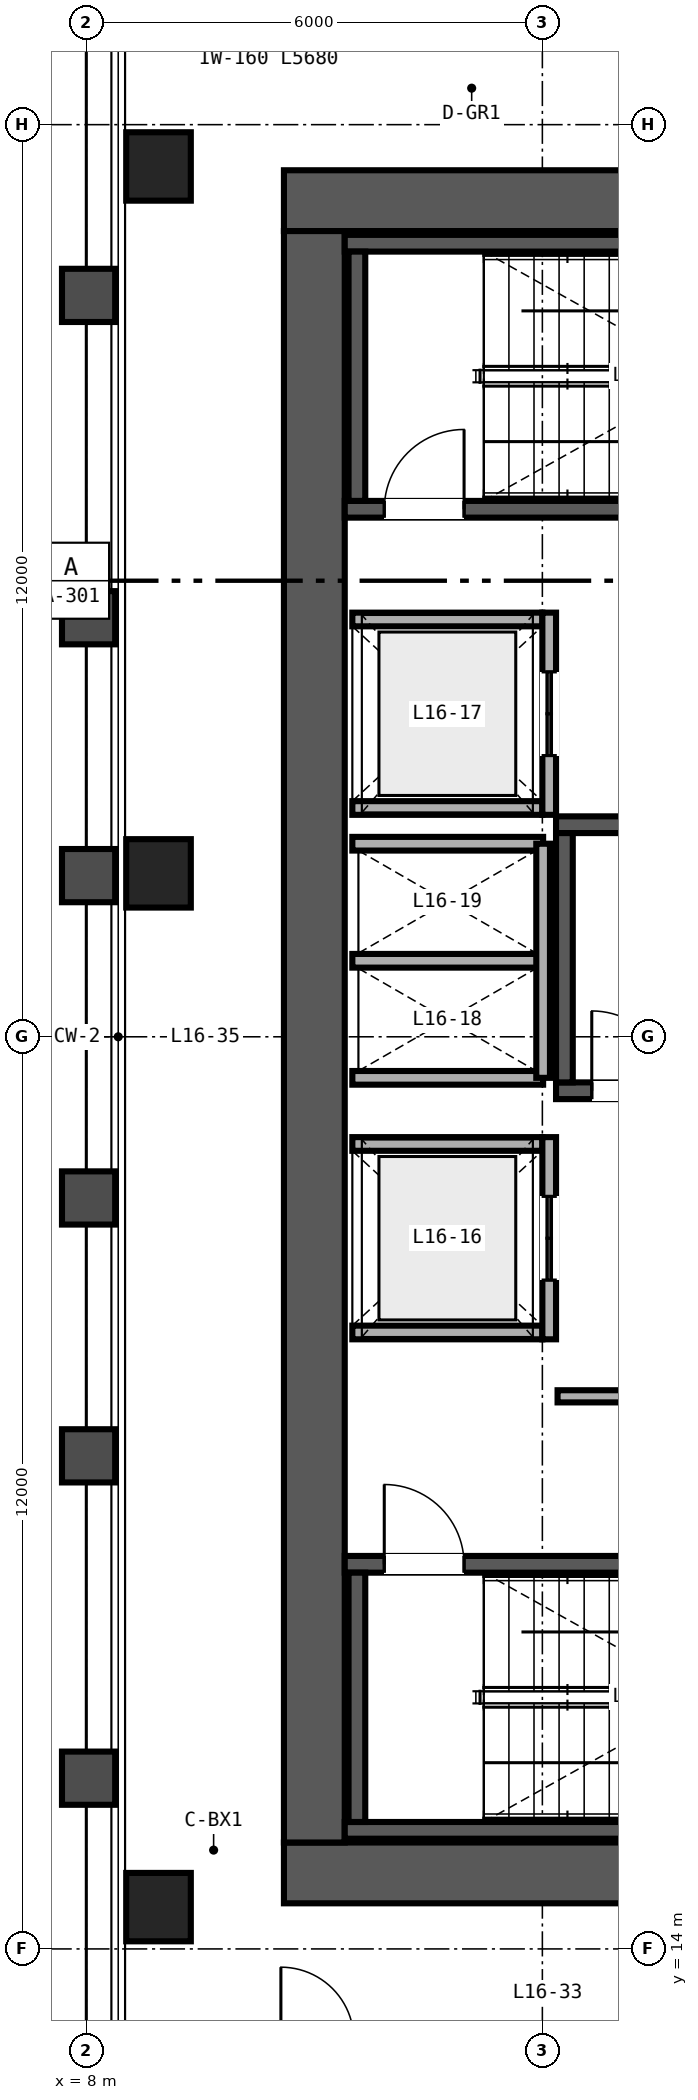
"""IFC4 building model, lengths in metres.
Left out: names, types, materials, properties, quantities, classifications, styles, units other than length and angle.
Written with IfcOpenShell. Run it as: python <this file> out.ifc"""

import sys

from ifc_helpers import new_model, si_unit, direction, frame, frame_2d, origin, origin_2d, place, context, subcontext, project, spatial, rectangle, hollow_rectangle, extrude, source, transform, mapped, element, fill, save


model = new_model("IFC4")
c1 = context("Model", 3, precision=1e-05, world=origin(), true_north=direction((0.0, 1.0)))
c2 = subcontext(c1, "Body", "Model", "MODEL_VIEW")
j1 = project(units=[si_unit("LENGTHUNIT", "METRE"), si_unit("PLANEANGLEUNIT", "RADIAN")], contexts=[c1])
p1 = place(None, origin())
s1 = spatial("IfcSite", under=j1, at=p1, CompositionType="ELEMENT")
p2 = place(p1, origin())
s2 = spatial("IfcBuilding", under=s1, at=p2, CompositionType="ELEMENT")
p3 = place(p2, frame((0.0, 0.0, 67.2)))
s3 = spatial("IfcBuildingStorey", under=s2, at=p3, CompositionType="ELEMENT", Elevation=67.2)
p4 = place(p3, frame((10.6, 15.0, 0.0), z_axis=(0.0, 0.0, 1.0), x_axis=(1.0, 0.0, 0.0)))
e1 = element("IfcWall", 1, at=p4, inside=s3, PredefinedType="SHEAR", context=c2, shape_type="SweptSolid", body=[
    extrude(rectangle(XDim=12.8, YDim=0.8, at=frame_2d((6.4, 0.0))), origin(), (0.0, 0.0, 1.0), 3.35),
])
p5 = place(p4, frame((8.98, 0.0, 0.0)))
e2 = element("IfcOpeningElement", 2, at=p5, cuts=e1, PredefinedType="OPENING", context=c2, shape_type="SweptSolid", body=[
    extrude(rectangle(XDim=1.0, YDim=2.15, at=frame_2d((0.5, 1.075))), frame((0.0, 0.41, 0.0), z_axis=(0.0, -1.0, 0.0), x_axis=(1.0, 0.0, 0.0)), (0.0, 0.0, 1.0), 0.82),
])
p6 = place(p3, frame((10.6, 37.0, 0.0), z_axis=(0.0, 0.0, 1.0), x_axis=(1.0, 0.0, 0.0)))
e3 = element("IfcWall", 3, at=p6, inside=s3, PredefinedType="SHEAR", context=c2, shape_type="SweptSolid", body=[
    extrude(rectangle(XDim=12.8, YDim=0.8, at=frame_2d((6.4, 0.0))), origin(), (0.0, 0.0, 1.0), 3.35),
])
p7 = place(p6, frame((8.98, 0.0, 0.0)))
e4 = element("IfcOpeningElement", 4, at=p7, cuts=e3, PredefinedType="OPENING", context=c2, shape_type="SweptSolid", body=[
    extrude(rectangle(XDim=1.0, YDim=2.15, at=frame_2d((0.5, 1.075))), frame((0.0, 0.41, 0.0), z_axis=(0.0, -1.0, 0.0), x_axis=(1.0, 0.0, 0.0)), (0.0, 0.0, 1.0), 0.82),
])
p8 = place(p3, frame((11.0, 15.4, 0.0), z_axis=(0.0, 0.0, 1.0), x_axis=(0.0, 1.0, 0.0)))
e5 = element("IfcWall", 5, at=p8, inside=s3, PredefinedType="SHEAR", context=c2, shape_type="SweptSolid", body=[
    extrude(rectangle(XDim=21.2, YDim=0.8, at=frame_2d((10.6, 0.0))), origin(), (0.0, 0.0, 1.0), 3.35),
])
p9 = place(p3, frame((11.4, 15.56, 0.0), z_axis=(0.0, 0.0, 1.0), x_axis=(1.0, 0.0, 0.0)))
e6 = element("IfcWall", 6, at=p9, inside=s3, PredefinedType="SHEAR", context=c2, shape_type="SweptSolid", body=[
    extrude(rectangle(XDim=7.91, YDim=0.22, at=frame_2d((3.955, 0.0))), origin(), (0.0, 0.0, 1.0), 3.4),
])
p10 = place(p3, frame((11.4, 19.06, 0.0), z_axis=(0.0, 0.0, 1.0), x_axis=(1.0, 0.0, 0.0)))
e7 = element("IfcWall", 7, at=p10, inside=s3, PredefinedType="SHEAR", context=c2, shape_type="SweptSolid", body=[
    extrude(rectangle(XDim=7.91, YDim=0.22, at=frame_2d((3.955, 0.0))), origin(), (0.0, 0.0, 1.0), 3.4),
])
p11 = place(p10, frame((0.52, 0.0, 0.0)))
e8 = element("IfcOpeningElement", 8, at=p11, cuts=e7, PredefinedType="OPENING", context=c2, shape_type="SweptSolid", body=[
    extrude(rectangle(XDim=1.05, YDim=2.15, at=frame_2d((0.525, 1.075))), frame((0.0, 0.12, 0.0), z_axis=(0.0, -1.0, 0.0), x_axis=(1.0, 0.0, 0.0)), (0.0, 0.0, 1.0), 0.24),
])
p12 = place(p3, frame((11.56, 15.67, 0.0), z_axis=(0.0, 0.0, 1.0), x_axis=(0.0, 1.0, 0.0)))
e9 = element("IfcWall", 9, at=p12, inside=s3, PredefinedType="SHEAR", context=c2, shape_type="SweptSolid", body=[
    extrude(rectangle(XDim=3.28, YDim=0.22, at=frame_2d((1.64, 0.0))), origin(), (0.0, 0.0, 1.0), 3.4),
])
p13 = place(p3, frame((11.4, 32.94, 0.0), z_axis=(0.0, 0.0, 1.0), x_axis=(1.0, 0.0, 0.0)))
e10 = element("IfcWall", 10, at=p13, inside=s3, PredefinedType="SHEAR", context=c2, shape_type="SweptSolid", body=[
    extrude(rectangle(XDim=7.91, YDim=0.22, at=frame_2d((3.955, 0.0))), origin(), (0.0, 0.0, 1.0), 3.4),
])
p14 = place(p13, frame((0.52, 0.0, 0.0)))
e11 = element("IfcOpeningElement", 11, at=p14, cuts=e10, PredefinedType="OPENING", context=c2, shape_type="SweptSolid", body=[
    extrude(rectangle(XDim=1.05, YDim=2.15, at=frame_2d((0.525, 1.075))), frame((0.0, 0.12, 0.0), z_axis=(0.0, -1.0, 0.0), x_axis=(1.0, 0.0, 0.0)), (0.0, 0.0, 1.0), 0.24),
])
p15 = place(p3, frame((11.4, 36.44, 0.0), z_axis=(0.0, 0.0, 1.0), x_axis=(1.0, 0.0, 0.0)))
e12 = element("IfcWall", 12, at=p15, inside=s3, PredefinedType="SHEAR", context=c2, shape_type="SweptSolid", body=[
    extrude(rectangle(XDim=7.91, YDim=0.22, at=frame_2d((3.955, 0.0))), origin(), (0.0, 0.0, 1.0), 3.4),
])
p16 = place(p3, frame((11.56, 33.05, 0.0), z_axis=(0.0, 0.0, 1.0), x_axis=(0.0, 1.0, 0.0)))
e13 = element("IfcWall", 13, at=p16, inside=s3, PredefinedType="SHEAR", context=c2, shape_type="SweptSolid", body=[
    extrude(rectangle(XDim=3.28, YDim=0.22, at=frame_2d((1.64, 0.0))), origin(), (0.0, 0.0, 1.0), 3.4),
])
p17 = place(p3, frame((14.18, 25.29, 0.0), z_axis=(0.0, 0.0, 1.0), x_axis=(1.0, 0.0, 0.0)))
e14 = element("IfcWall", 14, at=p17, inside=s3, PredefinedType="SHEAR", context=c2, shape_type="SweptSolid", body=[
    extrude(rectangle(XDim=8.42, YDim=0.22, at=frame_2d((4.21, 0.0))), origin(), (0.0, 0.0, 1.0), 3.4),
])
p18 = place(p17, frame((0.47, 0.0, 0.0)))
e15 = element("IfcOpeningElement", 15, at=p18, cuts=e14, PredefinedType="OPENING", context=c2, shape_type="SweptSolid", body=[
    extrude(rectangle(XDim=1.05, YDim=2.15, at=frame_2d((0.525, 1.075))), frame((0.0, 0.12, 0.0), z_axis=(0.0, -1.0, 0.0), x_axis=(1.0, 0.0, 0.0)), (0.0, 0.0, 1.0), 0.24),
])
p19 = place(p3, frame((14.18, 28.79, 0.0), z_axis=(0.0, 0.0, 1.0), x_axis=(1.0, 0.0, 0.0)))
e16 = element("IfcWall", 16, at=p19, inside=s3, PredefinedType="SHEAR", context=c2, shape_type="SweptSolid", body=[
    extrude(rectangle(XDim=8.42, YDim=0.22, at=frame_2d((4.21, 0.0))), origin(), (0.0, 0.0, 1.0), 3.4),
])
p20 = place(p3, frame((14.29, 25.4, 0.0), z_axis=(0.0, 0.0, 1.0), x_axis=(0.0, 1.0, 0.0)))
e17 = element("IfcWall", 17, at=p20, inside=s3, PredefinedType="SHEAR", context=c2, shape_type="SweptSolid", body=[
    extrude(rectangle(XDim=3.28, YDim=0.22, at=frame_2d((1.64, 0.0))), origin(), (0.0, 0.0, 1.0), 3.4),
])
m1 = source(origin(), c2, "Body", "SweptSolid", [
    extrude(hollow_rectangle(XDim=0.85, YDim=0.9, WallThickness=0.04, at=origin_2d()), origin(), (0.0, 0.0, 1.0), 3.35),
])
for number, where, z_axis, x_axis in (
    (18, (8.95, 14.55, 0.0), (0.0, 0.0, 1.0), (1.0, 0.0, 0.0)),
    (19, (8.95, 28.15, 0.0), (0.0, 0.0, 1.0), (1.0, 0.0, 0.0)),
    (20, (8.95, 37.45, 0.0), (0.0, 0.0, 1.0), (1.0, 0.0, 0.0)),
):
    element("IfcColumn", number, at=place(p3, frame(where, z_axis=z_axis, x_axis=x_axis)), inside=s3, PredefinedType="COLUMN", context=c2, shape_type="MappedRepresentation", body=[
        mapped(m1, transform((0.0, 0.0, 0.0), scale=1.0)),
    ])
for number, where, z_axis, x_axis in (
    (21, (11.5, 22.11, 0.0), (0.0, 0.0, 1.0), (1.0, 0.0, 0.0)),
    (22, (11.5, 24.59, 0.0), (0.0, 0.0, 1.0), (1.0, 0.0, 0.0)),
):
    element("IfcWall", number, at=place(p3, frame(where, z_axis=z_axis, x_axis=x_axis)), inside=s3, PredefinedType="SOLIDWALL", context=c2, shape_type="SweptSolid", body=[
        extrude(rectangle(XDim=2.5, YDim=0.18, at=frame_2d((1.25, 0.0))), origin(), (0.0, 0.0, 1.0), 3.35),
    ])
p21 = place(p3, frame((14.09, 22.02, 0.0), z_axis=(0.0, 0.0, 1.0), x_axis=(0.0, 1.0, 0.0)))
e23 = element("IfcWall", 23, at=p21, inside=s3, PredefinedType="SOLIDWALL", context=c2, shape_type="SweptSolid", body=[
    extrude(rectangle(XDim=2.66, YDim=0.18, at=frame_2d((1.33, 0.0))), origin(), (0.0, 0.0, 1.0), 3.35),
])
p22 = place(p21, frame((0.78, 0.0, 0.0)))
e24 = element("IfcOpeningElement", 24, at=p22, cuts=e23, PredefinedType="OPENING", context=c2, shape_type="SweptSolid", body=[
    extrude(rectangle(XDim=1.1, YDim=2.2, at=frame_2d((0.55, 1.1))), frame((0.0, 0.1, 0.0), z_axis=(0.0, -1.0, 0.0), x_axis=(1.0, 0.0, 0.0)), (0.0, 0.0, 1.0), 0.2),
])
for number, where, z_axis, x_axis in (
    (25, (11.5, 29.01, 0.0), (0.0, 0.0, 1.0), (1.0, 0.0, 0.0)),
    (26, (11.5, 31.49, 0.0), (0.0, 0.0, 1.0), (1.0, 0.0, 0.0)),
):
    element("IfcWall", number, at=place(p3, frame(where, z_axis=z_axis, x_axis=x_axis)), inside=s3, PredefinedType="SOLIDWALL", context=c2, shape_type="SweptSolid", body=[
        extrude(rectangle(XDim=2.5, YDim=0.18, at=frame_2d((1.25, 0.0))), origin(), (0.0, 0.0, 1.0), 3.35),
    ])
p23 = place(p3, frame((14.09, 28.92, 0.0), z_axis=(0.0, 0.0, 1.0), x_axis=(0.0, 1.0, 0.0)))
e27 = element("IfcWall", 27, at=p23, inside=s3, PredefinedType="SOLIDWALL", context=c2, shape_type="SweptSolid", body=[
    extrude(rectangle(XDim=2.66, YDim=0.18, at=frame_2d((1.33, 0.0))), origin(), (0.0, 0.0, 1.0), 3.35),
])
p24 = place(p23, frame((0.78, 0.0, 0.0)))
e28 = element("IfcOpeningElement", 28, at=p24, cuts=e27, PredefinedType="OPENING", context=c2, shape_type="SweptSolid", body=[
    extrude(rectangle(XDim=1.1, YDim=2.2, at=frame_2d((0.55, 1.1))), frame((0.0, 0.1, 0.0), z_axis=(0.0, -1.0, 0.0), x_axis=(1.0, 0.0, 0.0)), (0.0, 0.0, 1.0), 0.2),
])
for number, where, z_axis, x_axis in (
    (29, (11.5, 25.46, 0.0), (0.0, 0.0, 1.0), (1.0, 0.0, 0.0)),
    (30, (11.5, 27.0, 0.0), (0.0, 0.0, 1.0), (1.0, 0.0, 0.0)),
    (31, (11.5, 28.54, 0.0), (0.0, 0.0, 1.0), (1.0, 0.0, 0.0)),
):
    element("IfcWall", number, at=place(p3, frame(where, z_axis=z_axis, x_axis=x_axis)), inside=s3, PredefinedType="SOLIDWALL", context=c2, shape_type="SweptSolid", body=[
        extrude(rectangle(XDim=2.51, YDim=0.18, at=frame_2d((1.255, 0.0))), origin(), (0.0, 0.0, 1.0), 3.35),
    ])
p25 = place(p3, frame((14.01, 25.46, 0.0), z_axis=(0.0, 0.0, 1.0), x_axis=(0.0, 1.0, 0.0)))
e32 = element("IfcWall", 32, at=p25, inside=s3, PredefinedType="SOLIDWALL", context=c2, shape_type="SweptSolid", body=[
    extrude(rectangle(XDim=3.08, YDim=0.18, at=frame_2d((1.54, 0.0))), origin(), (0.0, 0.0, 1.0), 3.35),
])
p26 = place(p3, frame((14.2, 21.27, 0.0), z_axis=(0.0, 0.0, 1.0), x_axis=(1.0, 0.0, 0.0)))
e33 = element("IfcWall", 33, at=p26, inside=s3, PredefinedType="PARTITIONING", context=c2, shape_type="SweptSolid", body=[
    extrude(rectangle(XDim=4.58, YDim=0.16, at=frame_2d((2.29, 0.0))), origin(), (0.0, 0.0, 1.0), 3.35),
])
p27 = place(p26, frame((1.8, 0.0, 0.0)))
e34 = element("IfcOpeningElement", 34, at=p27, cuts=e33, PredefinedType="OPENING", context=c2, shape_type="SweptSolid", body=[
    extrude(rectangle(XDim=1.0, YDim=2.15, at=frame_2d((0.5, 1.075))), frame((0.0, 0.09, 0.0), z_axis=(0.0, -1.0, 0.0), x_axis=(1.0, 0.0, 0.0)), (0.0, 0.0, 1.0), 0.18),
])
m2 = source(origin(), c2, "Body", "SweptSolid", [
    extrude(rectangle(XDim=1.05, YDim=2.15, at=frame_2d((0.525, 1.075))), frame((0.0, 0.025, 0.0), z_axis=(0.0, -1.0, 0.0), x_axis=(1.0, 0.0, 0.0)), (0.0, 0.0, 1.0), 0.05),
])
p28 = place(p11, origin())
e35 = element("IfcDoor", 35, at=p28, inside=s3, OperationType="SINGLE_SWING_LEFT", PredefinedType="DOOR", context=c2, shape_type="MappedRepresentation", body=[
    mapped(m2, transform((0.0, 0.0, 0.0), scale=1.0)),
])
fill(e8, e35)
p29 = place(p14, origin())
e36 = element("IfcDoor", 36, at=p29, inside=s3, OperationType="SINGLE_SWING_RIGHT", PredefinedType="DOOR", context=c2, shape_type="MappedRepresentation", body=[
    mapped(m2, transform((0.0, 0.0, 0.0), scale=1.0)),
])
fill(e11, e36)
p30 = place(p18, origin())
e37 = element("IfcDoor", 37, at=p30, inside=s3, OperationType="SINGLE_SWING_LEFT", PredefinedType="DOOR", context=c2, shape_type="MappedRepresentation", body=[
    mapped(m2, transform((0.0, 0.0, 0.0), scale=1.0)),
])
fill(e15, e37)
m3 = source(origin(), c2, "Body", "SweptSolid", [
    extrude(rectangle(XDim=1.1, YDim=2.2, at=frame_2d((0.55, 1.1))), frame((0.0, 0.025, 0.0), z_axis=(0.0, -1.0, 0.0), x_axis=(1.0, 0.0, 0.0)), (0.0, 0.0, 1.0), 0.05),
])
p31 = place(p22, origin())
e38 = element("IfcDoor", 38, at=p31, inside=s3, OperationType="DOUBLE_DOOR_SLIDING", PredefinedType="DOOR", context=c2, shape_type="MappedRepresentation", body=[
    mapped(m3, transform((0.0, 0.0, 0.0), scale=1.0)),
])
fill(e24, e38)
p32 = place(p24, origin())
e39 = element("IfcDoor", 39, at=p32, inside=s3, OperationType="DOUBLE_DOOR_SLIDING", PredefinedType="DOOR", context=c2, shape_type="MappedRepresentation", body=[
    mapped(m3, transform((0.0, 0.0, 0.0), scale=1.0)),
])
fill(e28, e39)
save(model, sys.argv[1])
